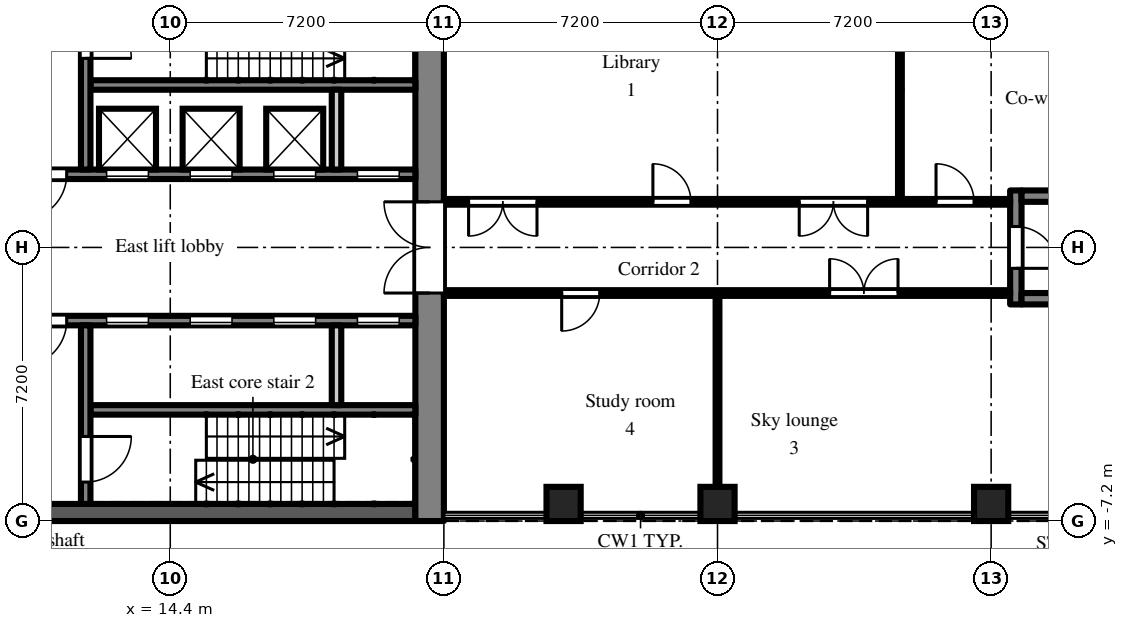
"""IFC4 building model, lengths in metres.
Left out: names, types, materials, properties, quantities, classifications, styles, units other than length and angle.
Written with IfcOpenShell. Run it as: python <this file> out.ifc"""

import sys

from ifc_helpers import new_model, si_unit, direction, frame, frame_2d, origin, origin_2d, place, context, subcontext, project, spatial, rectangle, extrude, element, fill, save


model = new_model("IFC4")
c1 = context("Model", 3, precision=1e-05, world=origin(), true_north=direction((0.0, 1.0)))
c2 = subcontext(c1, "Body", "Model", "MODEL_VIEW")
j1 = project(units=[si_unit("LENGTHUNIT", "METRE"), si_unit("PLANEANGLEUNIT", "RADIAN")], contexts=[c1])
p1 = place(None, origin())
s1 = spatial("IfcSite", under=j1, at=p1, CompositionType="ELEMENT")
p2 = place(p1, origin())
s2 = spatial("IfcBuilding", under=s1, at=p2, CompositionType="ELEMENT")
p3 = place(p2, frame((0.0, 0.0, 116.1)))
s3 = spatial("IfcBuildingStorey", under=s2, at=p3, CompositionType="ELEMENT", Elevation=116.1)
for number, where, z_axis, x_axis in (
    (1, (24.75, -6.75, 0.0), (0.0, 0.0, 1.0), (1.0, 0.0, 0.0)),
    (2, (28.8, -6.75, 0.0), (0.0, 0.0, 1.0), (1.0, 0.0, 0.0)),
    (3, (36.0, -6.75, 0.0), (0.0, 0.0, 1.0), (1.0, 0.0, 0.0)),
):
    element("IfcColumn", number, at=place(p3, frame(where, z_axis=z_axis, x_axis=x_axis)), inside=s3, PredefinedType="COLUMN", context=c2, shape_type="SweptSolid", body=[
        extrude(rectangle(XDim=0.9, YDim=0.9, at=origin_2d()), origin(), (0.0, 0.0, 1.0), 4.2),
    ])
p4 = place(p3, frame((21.225, -7.2, 0.0), z_axis=(0.0, 0.0, 1.0), x_axis=(0.0, 1.0, 0.0)))
e4 = element("IfcWall", 4, at=p4, inside=s3, PredefinedType="SHEAR", context=c2, shape_type="SweptSolid", body=[
    extrude(rectangle(XDim=14.4, YDim=0.75, at=frame_2d((7.2, 0.0))), origin(), (0.0, 0.0, 1.0), 3.8),
])
p5 = place(p4, frame((6.0, 0.0, 0.0)))
e5 = element("IfcOpeningElement", 5, at=p5, cuts=e4, PredefinedType="OPENING", context=c2, shape_type="SweptSolid", body=[
    extrude(rectangle(XDim=2.4, YDim=2.2, at=frame_2d((1.2, 1.1))), frame((0.0, 0.385, 0.0), z_axis=(0.0, -1.0, 0.0), x_axis=(1.0, 0.0, 0.0)), (0.0, 0.0, 1.0), 0.77),
])
p6 = place(p3, frame((7.9, 1.925, 0.0), z_axis=(0.0, 0.0, 1.0), x_axis=(1.0, 0.0, 0.0)))
e6 = element("IfcWall", 6, at=p6, inside=s3, PredefinedType="SHEAR", context=c2, shape_type="SweptSolid", body=[
    extrude(rectangle(XDim=12.95, YDim=0.25, at=frame_2d((6.475, 0.0))), origin(), (0.0, 0.0, 1.0), 3.8),
])
p7 = place(p6, frame((4.825, 0.0, 0.0)))
e7 = element("IfcOpeningElement", 7, at=p7, cuts=e6, PredefinedType="OPENING", context=c2, shape_type="SweptSolid", body=[
    extrude(rectangle(XDim=1.1, YDim=2.1, at=frame_2d((0.55, 1.05))), frame((0.0, 0.135, 0.0), z_axis=(0.0, -1.0, 0.0), x_axis=(1.0, 0.0, 0.0)), (0.0, 0.0, 1.0), 0.27),
])
p8 = place(p6, frame((7.025, 0.0, 0.0)))
e8 = element("IfcOpeningElement", 8, at=p8, cuts=e6, PredefinedType="OPENING", context=c2, shape_type="SweptSolid", body=[
    extrude(rectangle(XDim=1.1, YDim=2.1, at=frame_2d((0.55, 1.05))), frame((0.0, 0.135, 0.0), z_axis=(0.0, -1.0, 0.0), x_axis=(1.0, 0.0, 0.0)), (0.0, 0.0, 1.0), 0.27),
])
p9 = place(p6, frame((9.225, 0.0, 0.0)))
e9 = element("IfcOpeningElement", 9, at=p9, cuts=e6, PredefinedType="OPENING", context=c2, shape_type="SweptSolid", body=[
    extrude(rectangle(XDim=1.1, YDim=2.1, at=frame_2d((0.55, 1.05))), frame((0.0, 0.135, 0.0), z_axis=(0.0, -1.0, 0.0), x_axis=(1.0, 0.0, 0.0)), (0.0, 0.0, 1.0), 0.27),
])
p10 = place(p6, frame((11.425, 0.0, 0.0)))
e10 = element("IfcOpeningElement", 10, at=p10, cuts=e6, PredefinedType="OPENING", context=c2, shape_type="SweptSolid", body=[
    extrude(rectangle(XDim=1.1, YDim=2.1, at=frame_2d((0.55, 1.05))), frame((0.0, 0.135, 0.0), z_axis=(0.0, -1.0, 0.0), x_axis=(1.0, 0.0, 0.0)), (0.0, 0.0, 1.0), 0.27),
])
p11 = place(p6, frame((0.525, 0.0, 0.0)))
e11 = element("IfcOpeningElement", 11, at=p11, cuts=e6, PredefinedType="OPENING", context=c2, shape_type="SweptSolid", body=[
    extrude(rectangle(XDim=0.9, YDim=2.1, at=frame_2d((0.45, 1.05))), frame((0.0, 0.135, 0.0), z_axis=(0.0, -1.0, 0.0), x_axis=(1.0, 0.0, 0.0)), (0.0, 0.0, 1.0), 0.27),
])
p12 = place(p6, frame((2.575, 0.0, 0.0)))
e12 = element("IfcOpeningElement", 12, at=p12, cuts=e6, PredefinedType="OPENING", context=c2, shape_type="SweptSolid", body=[
    extrude(rectangle(XDim=1.2, YDim=2.1, at=frame_2d((0.6, 1.05))), frame((0.0, 0.135, 0.0), z_axis=(0.0, -1.0, 0.0), x_axis=(1.0, 0.0, 0.0)), (0.0, 0.0, 1.0), 0.27),
])
p13 = place(p3, frame((12.3, 4.275, 0.0), z_axis=(0.0, 0.0, 1.0), x_axis=(1.0, 0.0, 0.0)))
e13 = element("IfcWall", 13, at=p13, inside=s3, PredefinedType="SHEAR", context=c2, shape_type="SweptSolid", body=[
    extrude(rectangle(XDim=8.55, YDim=0.25, at=frame_2d((4.275, 0.0))), origin(), (0.0, 0.0, 1.0), 3.8),
])
p14 = place(p3, frame((12.175, 2.05, 0.0), z_axis=(0.0, 0.0, 1.0), x_axis=(0.0, 1.0, 0.0)))
e14 = element("IfcWall", 14, at=p14, inside=s3, PredefinedType="SHEAR", context=c2, shape_type="SweptSolid", body=[
    extrude(rectangle(XDim=4.7, YDim=0.25, at=frame_2d((2.35, 0.0))), origin(), (0.0, 0.0, 1.0), 3.8),
])
p15 = place(p14, frame((2.925, 0.0, 0.0)))
e15 = element("IfcOpeningElement", 15, at=p15, cuts=e14, PredefinedType="OPENING", context=c2, shape_type="SweptSolid", body=[
    extrude(rectangle(XDim=1.2, YDim=2.1, at=frame_2d((0.6, 1.05))), frame((0.0, 0.135, 0.0), z_axis=(0.0, -1.0, 0.0), x_axis=(1.0, 0.0, 0.0)), (0.0, 0.0, 1.0), 0.27),
])
p16 = place(p3, frame((18.775, 2.05, 0.0), z_axis=(0.0, 0.0, 1.0), x_axis=(0.0, 1.0, 0.0)))
e16 = element("IfcWall", 16, at=p16, inside=s3, PredefinedType="PARTITIONING", context=c2, shape_type="SweptSolid", body=[
    extrude(rectangle(XDim=2.1, YDim=0.25, at=frame_2d((1.05, 0.0))), origin(), (0.0, 0.0, 1.0), 3.8),
])
p17 = place(p3, frame((7.9, -6.975, 0.0), z_axis=(0.0, 0.0, 1.0), x_axis=(1.0, 0.0, 0.0)))
e17 = element("IfcWall", 17, at=p17, inside=s3, PredefinedType="SHEAR", context=c2, shape_type="SweptSolid", body=[
    extrude(rectangle(XDim=12.95, YDim=0.45, at=frame_2d((6.475, 0.0))), origin(), (0.0, 0.0, 1.0), 3.8),
])
p18 = place(p3, frame((7.9, -1.925, 0.0), z_axis=(0.0, 0.0, 1.0), x_axis=(1.0, 0.0, 0.0)))
e18 = element("IfcWall", 18, at=p18, inside=s3, PredefinedType="SHEAR", context=c2, shape_type="SweptSolid", body=[
    extrude(rectangle(XDim=12.95, YDim=0.25, at=frame_2d((6.475, 0.0))), origin(), (0.0, 0.0, 1.0), 3.8),
])
p19 = place(p18, frame((4.825, 0.0, 0.0)))
e19 = element("IfcOpeningElement", 19, at=p19, cuts=e18, PredefinedType="OPENING", context=c2, shape_type="SweptSolid", body=[
    extrude(rectangle(XDim=1.1, YDim=2.1, at=frame_2d((0.55, 1.05))), frame((0.0, 0.135, 0.0), z_axis=(0.0, -1.0, 0.0), x_axis=(1.0, 0.0, 0.0)), (0.0, 0.0, 1.0), 0.27),
])
p20 = place(p18, frame((7.025, 0.0, 0.0)))
e20 = element("IfcOpeningElement", 20, at=p20, cuts=e18, PredefinedType="OPENING", context=c2, shape_type="SweptSolid", body=[
    extrude(rectangle(XDim=1.1, YDim=2.1, at=frame_2d((0.55, 1.05))), frame((0.0, 0.135, 0.0), z_axis=(0.0, -1.0, 0.0), x_axis=(1.0, 0.0, 0.0)), (0.0, 0.0, 1.0), 0.27),
])
p21 = place(p18, frame((9.225, 0.0, 0.0)))
e21 = element("IfcOpeningElement", 21, at=p21, cuts=e18, PredefinedType="OPENING", context=c2, shape_type="SweptSolid", body=[
    extrude(rectangle(XDim=1.1, YDim=2.1, at=frame_2d((0.55, 1.05))), frame((0.0, 0.135, 0.0), z_axis=(0.0, -1.0, 0.0), x_axis=(1.0, 0.0, 0.0)), (0.0, 0.0, 1.0), 0.27),
])
p22 = place(p18, frame((11.425, 0.0, 0.0)))
e22 = element("IfcOpeningElement", 22, at=p22, cuts=e18, PredefinedType="OPENING", context=c2, shape_type="SweptSolid", body=[
    extrude(rectangle(XDim=1.1, YDim=2.1, at=frame_2d((0.55, 1.05))), frame((0.0, 0.135, 0.0), z_axis=(0.0, -1.0, 0.0), x_axis=(1.0, 0.0, 0.0)), (0.0, 0.0, 1.0), 0.27),
])
p23 = place(p18, frame((0.525, 0.0, 0.0)))
e23 = element("IfcOpeningElement", 23, at=p23, cuts=e18, PredefinedType="OPENING", context=c2, shape_type="SweptSolid", body=[
    extrude(rectangle(XDim=0.9, YDim=2.1, at=frame_2d((0.45, 1.05))), frame((0.0, 0.135, 0.0), z_axis=(0.0, -1.0, 0.0), x_axis=(1.0, 0.0, 0.0)), (0.0, 0.0, 1.0), 0.27),
])
p24 = place(p18, frame((2.575, 0.0, 0.0)))
e24 = element("IfcOpeningElement", 24, at=p24, cuts=e18, PredefinedType="OPENING", context=c2, shape_type="SweptSolid", body=[
    extrude(rectangle(XDim=1.2, YDim=2.1, at=frame_2d((0.6, 1.05))), frame((0.0, 0.135, 0.0), z_axis=(0.0, -1.0, 0.0), x_axis=(1.0, 0.0, 0.0)), (0.0, 0.0, 1.0), 0.27),
])
p25 = place(p3, frame((12.3, -4.275, 0.0), z_axis=(0.0, 0.0, 1.0), x_axis=(1.0, 0.0, 0.0)))
e25 = element("IfcWall", 25, at=p25, inside=s3, PredefinedType="SHEAR", context=c2, shape_type="SweptSolid", body=[
    extrude(rectangle(XDim=8.55, YDim=0.25, at=frame_2d((4.275, 0.0))), origin(), (0.0, 0.0, 1.0), 3.8),
])
p26 = place(p3, frame((12.175, -2.05, 0.0), z_axis=(0.0, 0.0, 1.0), x_axis=(0.0, -1.0, 0.0)))
e26 = element("IfcWall", 26, at=p26, inside=s3, PredefinedType="SHEAR", context=c2, shape_type="SweptSolid", body=[
    extrude(rectangle(XDim=4.7, YDim=0.25, at=frame_2d((2.35, 0.0))), origin(), (0.0, 0.0, 1.0), 3.8),
])
p27 = place(p26, frame((2.925, 0.0, 0.0)))
e27 = element("IfcOpeningElement", 27, at=p27, cuts=e26, PredefinedType="OPENING", context=c2, shape_type="SweptSolid", body=[
    extrude(rectangle(XDim=1.2, YDim=2.1, at=frame_2d((0.6, 1.05))), frame((0.0, 0.135, 0.0), z_axis=(0.0, -1.0, 0.0), x_axis=(1.0, 0.0, 0.0)), (0.0, 0.0, 1.0), 0.27),
])
p28 = place(p3, frame((18.775, -2.05, 0.0), z_axis=(0.0, 0.0, 1.0), x_axis=(0.0, -1.0, 0.0)))
e28 = element("IfcWall", 28, at=p28, inside=s3, PredefinedType="PARTITIONING", context=c2, shape_type="SweptSolid", body=[
    extrude(rectangle(XDim=2.1, YDim=0.25, at=frame_2d((1.05, 0.0))), origin(), (0.0, 0.0, 1.0), 3.8),
])
p29 = place(p3, frame((36.65, -1.5, 0.0), z_axis=(0.0, 0.0, 1.0), x_axis=(0.0, 1.0, 0.0)))
e29 = element("IfcWall", 29, at=p29, inside=s3, PredefinedType="SHEAR", context=c2, shape_type="SweptSolid", body=[
    extrude(rectangle(XDim=3.0, YDim=0.3, at=frame_2d((1.5, 0.0))), origin(), (0.0, 0.0, 1.0), 3.8),
])
p30 = place(p29, frame((0.95, 0.0, 0.0)))
e30 = element("IfcOpeningElement", 30, at=p30, cuts=e29, PredefinedType="OPENING", context=c2, shape_type="SweptSolid", body=[
    extrude(rectangle(XDim=1.1, YDim=2.1, at=frame_2d((0.55, 1.05))), frame((0.0, 0.16, 0.0), z_axis=(0.0, -1.0, 0.0), x_axis=(1.0, 0.0, 0.0)), (0.0, 0.0, 1.0), 0.32),
])
for number, where, z_axis, x_axis in (
    (31, (36.8, -1.35, 0.0), (0.0, 0.0, 1.0), (1.0, 0.0, 0.0)),
    (32, (36.8, 1.35, 0.0), (0.0, 0.0, 1.0), (1.0, 0.0, 0.0)),
):
    element("IfcWall", number, at=place(p3, frame(where, z_axis=z_axis, x_axis=x_axis)), inside=s3, PredefinedType="SHEAR", context=c2, shape_type="SweptSolid", body=[
        extrude(rectangle(XDim=5.8, YDim=0.3, at=frame_2d((2.9, 0.0))), origin(), (0.0, 0.0, 1.0), 3.8),
    ])
p31 = place(p3, frame((21.6, -1.2, 0.0), z_axis=(0.0, 0.0, 1.0), x_axis=(1.0, 0.0, 0.0)))
e33 = element("IfcWall", 33, at=p31, inside=s3, PredefinedType="PARTITIONING", context=c2, shape_type="SweptSolid", body=[
    extrude(rectangle(XDim=14.9, YDim=0.15, at=frame_2d((7.45, 0.0))), origin(), (0.0, 0.0, 1.0), 3.8),
])
p32 = place(p31, frame((3.1, 0.0, 0.0)))
e34 = element("IfcOpeningElement", 34, at=p32, cuts=e33, PredefinedType="OPENING", context=c2, shape_type="SweptSolid", body=[
    extrude(rectangle(XDim=1.0, YDim=2.1, at=frame_2d((0.5, 1.05))), frame((0.0, 0.085, 0.0), z_axis=(0.0, -1.0, 0.0), x_axis=(1.0, 0.0, 0.0)), (0.0, 0.0, 1.0), 0.17),
])
p33 = place(p31, frame((10.15, 0.0, 0.0)))
e35 = element("IfcOpeningElement", 35, at=p33, cuts=e33, PredefinedType="OPENING", context=c2, shape_type="SweptSolid", body=[
    extrude(rectangle(XDim=1.8, YDim=2.1, at=frame_2d((0.9, 1.05))), frame((0.0, 0.085, 0.0), z_axis=(0.0, -1.0, 0.0), x_axis=(1.0, 0.0, 0.0)), (0.0, 0.0, 1.0), 0.17),
])
p34 = place(p3, frame((21.6, 1.2, 0.0), z_axis=(0.0, 0.0, 1.0), x_axis=(1.0, 0.0, 0.0)))
e36 = element("IfcWall", 36, at=p34, inside=s3, PredefinedType="PARTITIONING", context=c2, shape_type="SweptSolid", body=[
    extrude(rectangle(XDim=14.9, YDim=0.15, at=frame_2d((7.45, 0.0))), origin(), (0.0, 0.0, 1.0), 3.8),
])
p35 = place(p34, frame((0.65, 0.0, 0.0)))
e37 = element("IfcOpeningElement", 37, at=p35, cuts=e36, PredefinedType="OPENING", context=c2, shape_type="SweptSolid", body=[
    extrude(rectangle(XDim=1.8, YDim=2.1, at=frame_2d((0.9, 1.05))), frame((0.0, 0.085, 0.0), z_axis=(0.0, -1.0, 0.0), x_axis=(1.0, 0.0, 0.0)), (0.0, 0.0, 1.0), 0.17),
])
p36 = place(p34, frame((5.5, 0.0, 0.0)))
e38 = element("IfcOpeningElement", 38, at=p36, cuts=e36, PredefinedType="OPENING", context=c2, shape_type="SweptSolid", body=[
    extrude(rectangle(XDim=1.0, YDim=2.1, at=frame_2d((0.5, 1.05))), frame((0.0, 0.085, 0.0), z_axis=(0.0, -1.0, 0.0), x_axis=(1.0, 0.0, 0.0)), (0.0, 0.0, 1.0), 0.17),
])
p37 = place(p34, frame((9.35, 0.0, 0.0)))
e39 = element("IfcOpeningElement", 39, at=p37, cuts=e36, PredefinedType="OPENING", context=c2, shape_type="SweptSolid", body=[
    extrude(rectangle(XDim=1.8, YDim=2.1, at=frame_2d((0.9, 1.05))), frame((0.0, 0.085, 0.0), z_axis=(0.0, -1.0, 0.0), x_axis=(1.0, 0.0, 0.0)), (0.0, 0.0, 1.0), 0.17),
])
p38 = place(p34, frame((12.95, 0.0, 0.0)))
e40 = element("IfcOpeningElement", 40, at=p38, cuts=e36, PredefinedType="OPENING", context=c2, shape_type="SweptSolid", body=[
    extrude(rectangle(XDim=1.0, YDim=2.1, at=frame_2d((0.5, 1.05))), frame((0.0, 0.085, 0.0), z_axis=(0.0, -1.0, 0.0), x_axis=(1.0, 0.0, 0.0)), (0.0, 0.0, 1.0), 0.17),
])
p39 = place(p3, frame((28.8, -6.9, 0.0), z_axis=(0.0, 0.0, 1.0), x_axis=(0.0, 1.0, 0.0)))
e41 = element("IfcWall", 41, at=p39, inside=s3, PredefinedType="PARTITIONING", context=c2, shape_type="SweptSolid", body=[
    extrude(rectangle(XDim=5.625, YDim=0.1, at=frame_2d((2.812, 0.0))), origin(), (0.0, 0.0, 1.0), 3.8),
])
p40 = place(p3, frame((33.6, 1.275, 0.0), z_axis=(0.0, 0.0, 1.0), x_axis=(0.0, 1.0, 0.0)))
e42 = element("IfcWall", 42, at=p40, inside=s3, PredefinedType="PARTITIONING", context=c2, shape_type="SweptSolid", body=[
    extrude(rectangle(XDim=5.745, YDim=0.1, at=frame_2d((2.873, 0.0))), origin(), (0.0, 0.0, 1.0), 3.8),
])
p41 = place(p19, origin())
e43 = element("IfcDoor", 43, at=p41, inside=s3, OperationType="SLIDING_TO_LEFT", PredefinedType="DOOR", context=c2, shape_type="SweptSolid", body=[
    extrude(rectangle(XDim=1.1, YDim=2.1, at=frame_2d((0.55, 1.05))), frame((0.0, 0.025, 0.0), z_axis=(0.0, -1.0, 0.0), x_axis=(1.0, 0.0, 0.0)), (0.0, 0.0, 1.0), 0.05),
])
fill(e19, e43)
p42 = place(p20, origin())
e44 = element("IfcDoor", 44, at=p42, inside=s3, OperationType="SLIDING_TO_LEFT", PredefinedType="DOOR", context=c2, shape_type="SweptSolid", body=[
    extrude(rectangle(XDim=1.1, YDim=2.1, at=frame_2d((0.55, 1.05))), frame((0.0, 0.025, 0.0), z_axis=(0.0, -1.0, 0.0), x_axis=(1.0, 0.0, 0.0)), (0.0, 0.0, 1.0), 0.05),
])
fill(e20, e44)
p43 = place(p21, origin())
e45 = element("IfcDoor", 45, at=p43, inside=s3, OperationType="SLIDING_TO_LEFT", PredefinedType="DOOR", context=c2, shape_type="SweptSolid", body=[
    extrude(rectangle(XDim=1.1, YDim=2.1, at=frame_2d((0.55, 1.05))), frame((0.0, 0.025, 0.0), z_axis=(0.0, -1.0, 0.0), x_axis=(1.0, 0.0, 0.0)), (0.0, 0.0, 1.0), 0.05),
])
fill(e21, e45)
p44 = place(p22, origin())
e46 = element("IfcDoor", 46, at=p44, inside=s3, OperationType="SLIDING_TO_LEFT", PredefinedType="DOOR", context=c2, shape_type="SweptSolid", body=[
    extrude(rectangle(XDim=1.1, YDim=2.1, at=frame_2d((0.55, 1.05))), frame((0.0, 0.025, 0.0), z_axis=(0.0, -1.0, 0.0), x_axis=(1.0, 0.0, 0.0)), (0.0, 0.0, 1.0), 0.05),
])
fill(e22, e46)
p45 = place(p7, origin())
e47 = element("IfcDoor", 47, at=p45, inside=s3, OperationType="SLIDING_TO_LEFT", PredefinedType="DOOR", context=c2, shape_type="SweptSolid", body=[
    extrude(rectangle(XDim=1.1, YDim=2.1, at=frame_2d((0.55, 1.05))), frame((0.0, 0.025, 0.0), z_axis=(0.0, -1.0, 0.0), x_axis=(1.0, 0.0, 0.0)), (0.0, 0.0, 1.0), 0.05),
])
fill(e7, e47)
p46 = place(p8, origin())
e48 = element("IfcDoor", 48, at=p46, inside=s3, OperationType="SLIDING_TO_LEFT", PredefinedType="DOOR", context=c2, shape_type="SweptSolid", body=[
    extrude(rectangle(XDim=1.1, YDim=2.1, at=frame_2d((0.55, 1.05))), frame((0.0, 0.025, 0.0), z_axis=(0.0, -1.0, 0.0), x_axis=(1.0, 0.0, 0.0)), (0.0, 0.0, 1.0), 0.05),
])
fill(e8, e48)
p47 = place(p9, origin())
e49 = element("IfcDoor", 49, at=p47, inside=s3, OperationType="SLIDING_TO_LEFT", PredefinedType="DOOR", context=c2, shape_type="SweptSolid", body=[
    extrude(rectangle(XDim=1.1, YDim=2.1, at=frame_2d((0.55, 1.05))), frame((0.0, 0.025, 0.0), z_axis=(0.0, -1.0, 0.0), x_axis=(1.0, 0.0, 0.0)), (0.0, 0.0, 1.0), 0.05),
])
fill(e9, e49)
p48 = place(p10, origin())
e50 = element("IfcDoor", 50, at=p48, inside=s3, OperationType="SLIDING_TO_LEFT", PredefinedType="DOOR", context=c2, shape_type="SweptSolid", body=[
    extrude(rectangle(XDim=1.1, YDim=2.1, at=frame_2d((0.55, 1.05))), frame((0.0, 0.025, 0.0), z_axis=(0.0, -1.0, 0.0), x_axis=(1.0, 0.0, 0.0)), (0.0, 0.0, 1.0), 0.05),
])
fill(e10, e50)
p49 = place(p15, frame((1.2, 0.0, 0.0), z_axis=(0.0, 0.0, 1.0), x_axis=(-1.0, 0.0, 0.0)))
e51 = element("IfcDoor", 51, at=p49, inside=s3, OperationType="SINGLE_SWING_RIGHT", PredefinedType="DOOR", context=c2, shape_type="SweptSolid", body=[
    extrude(rectangle(XDim=1.2, YDim=2.1, at=frame_2d((0.6, 1.05))), frame((0.0, 0.025, 0.0), z_axis=(0.0, -1.0, 0.0), x_axis=(1.0, 0.0, 0.0)), (0.0, 0.0, 1.0), 0.05),
])
fill(e15, e51)
p50 = place(p27, origin())
e52 = element("IfcDoor", 52, at=p50, inside=s3, OperationType="SINGLE_SWING_LEFT", PredefinedType="DOOR", context=c2, shape_type="SweptSolid", body=[
    extrude(rectangle(XDim=1.2, YDim=2.1, at=frame_2d((0.6, 1.05))), frame((0.0, 0.025, 0.0), z_axis=(0.0, -1.0, 0.0), x_axis=(1.0, 0.0, 0.0)), (0.0, 0.0, 1.0), 0.05),
])
fill(e27, e52)
p51 = place(p12, frame((1.2, 0.0, 0.0), z_axis=(0.0, 0.0, 1.0), x_axis=(-1.0, 0.0, 0.0)))
e53 = element("IfcDoor", 53, at=p51, inside=s3, OperationType="SINGLE_SWING_RIGHT", PredefinedType="DOOR", context=c2, shape_type="SweptSolid", body=[
    extrude(rectangle(XDim=1.2, YDim=2.1, at=frame_2d((0.6, 1.05))), frame((0.0, 0.025, 0.0), z_axis=(0.0, -1.0, 0.0), x_axis=(1.0, 0.0, 0.0)), (0.0, 0.0, 1.0), 0.05),
])
fill(e12, e53)
p52 = place(p24, frame((1.2, 0.0, 0.0), z_axis=(0.0, 0.0, 1.0), x_axis=(-1.0, 0.0, 0.0)))
e54 = element("IfcDoor", 54, at=p52, inside=s3, OperationType="SINGLE_SWING_RIGHT", PredefinedType="DOOR", context=c2, shape_type="SweptSolid", body=[
    extrude(rectangle(XDim=1.2, YDim=2.1, at=frame_2d((0.6, 1.05))), frame((0.0, 0.025, 0.0), z_axis=(0.0, -1.0, 0.0), x_axis=(1.0, 0.0, 0.0)), (0.0, 0.0, 1.0), 0.05),
])
fill(e24, e54)
p53 = place(p5, origin())
e55 = element("IfcDoor", 55, at=p53, inside=s3, OperationType="DOUBLE_DOOR_DOUBLE_SWING", PredefinedType="DOOR", context=c2, shape_type="SweptSolid", body=[
    extrude(rectangle(XDim=2.4, YDim=2.2, at=frame_2d((1.2, 1.1))), frame((0.0, 0.025, 0.0), z_axis=(0.0, -1.0, 0.0), x_axis=(1.0, 0.0, 0.0)), (0.0, 0.0, 1.0), 0.05),
])
fill(e5, e55)
p54 = place(p30, frame((1.1, 0.0, 0.0), z_axis=(0.0, 0.0, 1.0), x_axis=(-1.0, 0.0, 0.0)))
e56 = element("IfcDoor", 56, at=p54, inside=s3, OperationType="SINGLE_SWING_RIGHT", PredefinedType="DOOR", context=c2, shape_type="SweptSolid", body=[
    extrude(rectangle(XDim=1.1, YDim=2.1, at=frame_2d((0.55, 1.05))), frame((0.0, 0.025, 0.0), z_axis=(0.0, -1.0, 0.0), x_axis=(1.0, 0.0, 0.0)), (0.0, 0.0, 1.0), 0.05),
])
fill(e30, e56)
p55 = place(p35, frame((1.8, 0.0, 0.0), z_axis=(0.0, 0.0, 1.0), x_axis=(-1.0, 0.0, 0.0)))
e57 = element("IfcDoor", 57, at=p55, inside=s3, OperationType="DOUBLE_DOOR_DOUBLE_SWING", PredefinedType="DOOR", context=c2, shape_type="SweptSolid", body=[
    extrude(rectangle(XDim=1.8, YDim=2.1, at=frame_2d((0.9, 1.05))), frame((0.0, 0.025, 0.0), z_axis=(0.0, -1.0, 0.0), x_axis=(1.0, 0.0, 0.0)), (0.0, 0.0, 1.0), 0.05),
])
fill(e37, e57)
p56 = place(p36, origin())
e58 = element("IfcDoor", 58, at=p56, inside=s3, OperationType="SINGLE_SWING_LEFT", PredefinedType="DOOR", context=c2, shape_type="SweptSolid", body=[
    extrude(rectangle(XDim=1.0, YDim=2.1, at=frame_2d((0.5, 1.05))), frame((0.0, 0.025, 0.0), z_axis=(0.0, -1.0, 0.0), x_axis=(1.0, 0.0, 0.0)), (0.0, 0.0, 1.0), 0.05),
])
fill(e38, e58)
p57 = place(p37, frame((1.8, 0.0, 0.0), z_axis=(0.0, 0.0, 1.0), x_axis=(-1.0, 0.0, 0.0)))
e59 = element("IfcDoor", 59, at=p57, inside=s3, OperationType="DOUBLE_DOOR_DOUBLE_SWING", PredefinedType="DOOR", context=c2, shape_type="SweptSolid", body=[
    extrude(rectangle(XDim=1.8, YDim=2.1, at=frame_2d((0.9, 1.05))), frame((0.0, 0.025, 0.0), z_axis=(0.0, -1.0, 0.0), x_axis=(1.0, 0.0, 0.0)), (0.0, 0.0, 1.0), 0.05),
])
fill(e39, e59)
p58 = place(p38, origin())
e60 = element("IfcDoor", 60, at=p58, inside=s3, OperationType="SINGLE_SWING_LEFT", PredefinedType="DOOR", context=c2, shape_type="SweptSolid", body=[
    extrude(rectangle(XDim=1.0, YDim=2.1, at=frame_2d((0.5, 1.05))), frame((0.0, 0.025, 0.0), z_axis=(0.0, -1.0, 0.0), x_axis=(1.0, 0.0, 0.0)), (0.0, 0.0, 1.0), 0.05),
])
fill(e40, e60)
p59 = place(p32, frame((1.0, 0.0, 0.0), z_axis=(0.0, 0.0, 1.0), x_axis=(-1.0, 0.0, 0.0)))
e61 = element("IfcDoor", 61, at=p59, inside=s3, OperationType="SINGLE_SWING_RIGHT", PredefinedType="DOOR", context=c2, shape_type="SweptSolid", body=[
    extrude(rectangle(XDim=1.0, YDim=2.1, at=frame_2d((0.5, 1.05))), frame((0.0, 0.025, 0.0), z_axis=(0.0, -1.0, 0.0), x_axis=(1.0, 0.0, 0.0)), (0.0, 0.0, 1.0), 0.05),
])
fill(e34, e61)
p60 = place(p33, origin())
e62 = element("IfcDoor", 62, at=p60, inside=s3, OperationType="DOUBLE_DOOR_DOUBLE_SWING", PredefinedType="DOOR", context=c2, shape_type="SweptSolid", body=[
    extrude(rectangle(XDim=1.8, YDim=2.1, at=frame_2d((0.9, 1.05))), frame((0.0, 0.025, 0.0), z_axis=(0.0, -1.0, 0.0), x_axis=(1.0, 0.0, 0.0)), (0.0, 0.0, 1.0), 0.05),
])
fill(e35, e62)
save(model, sys.argv[1])
